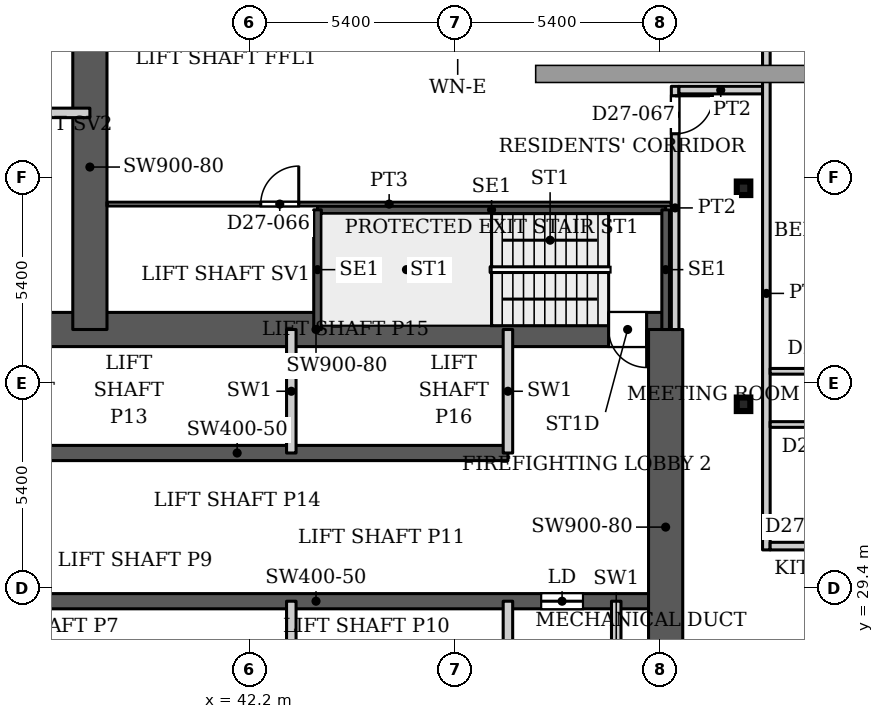
"""IFC4 building model, lengths in metres.
Left out: names, types, materials, properties, quantities, classifications, styles, units other than length and angle.
Written with IfcOpenShell. Run it as: python <this file> out.ifc"""

import sys

from ifc_helpers import new_model, si_unit, direction, frame, frame_2d, origin, origin_2d, place, context, subcontext, project, spatial, rectangle, hollow_rectangle, extrude, source, transform, mapped, element, fill, save


model = new_model("IFC4")
c1 = context("Model", 3, precision=1e-05, world=origin(), true_north=direction((0.0, 1.0)))
c2 = subcontext(c1, "Body", "Model", "MODEL_VIEW")
j1 = project(units=[si_unit("LENGTHUNIT", "METRE"), si_unit("PLANEANGLEUNIT", "RADIAN")], contexts=[c1])
p1 = place(None, origin())
s1 = spatial("IfcSite", under=j1, at=p1, CompositionType="ELEMENT")
p2 = place(p1, origin())
s2 = spatial("IfcBuilding", under=s1, at=p2, CompositionType="ELEMENT")
p3 = place(p2, frame((0.0, 0.0, 117.5)))
s3 = spatial("IfcBuildingStorey", under=s2, at=p3, CompositionType="ELEMENT", Elevation=117.5)
for number, where, z_axis, x_axis in (
    (1, (55.2, 34.232, 0.0), (0.0, 0.0, 1.0), (1.0, 0.0, 0.0)),
    (2, (55.2, 39.916, 0.0), (0.0, 0.0, 1.0), (1.0, 0.0, 0.0)),
):
    element("IfcColumn", number, at=place(p3, frame(where, z_axis=z_axis, x_axis=x_axis)), inside=s3, PredefinedType="COLUMN", context=c2, shape_type="SweptSolid", body=[
        extrude(hollow_rectangle(XDim=0.356, YDim=0.356, WallThickness=0.016, InnerFilletRadius=0.016, OuterFilletRadius=0.032, at=origin_2d()), origin(), (0.0, 0.0, 1.0), 3.9),
    ])
p4 = place(p3, frame((34.75, 29.05, 0.0), z_axis=(0.0, 0.0, 1.0), x_axis=(1.0, 0.0, 0.0)))
e3 = element("IfcWall", 3, at=p4, inside=s3, PredefinedType="SHEAR", context=c2, shape_type="SweptSolid", body=[
    extrude(rectangle(XDim=18.4, YDim=0.4, at=frame_2d((9.2, 0.0))), origin(), (0.0, 0.0, 1.0), 3.9),
])
p5 = place(p4, frame((15.125, 0.0, 0.0)))
e4 = element("IfcOpeningElement", 4, at=p5, cuts=e3, PredefinedType="OPENING", context=c2, shape_type="SweptSolid", body=[
    extrude(rectangle(XDim=1.1, YDim=2.2, at=frame_2d((0.55, 1.1))), frame((0.0, 0.21, 0.0), z_axis=(0.0, -1.0, 0.0), x_axis=(1.0, 0.0, 0.0)), (0.0, 0.0, 1.0), 0.42),
])
p6 = place(p3, frame((34.75, 32.95, 0.0), z_axis=(0.0, 0.0, 1.0), x_axis=(1.0, 0.0, 0.0)))
e5 = element("IfcWall", 5, at=p6, inside=s3, PredefinedType="SHEAR", context=c2, shape_type="SweptSolid", body=[
    extrude(rectangle(XDim=14.25, YDim=0.4, at=frame_2d((7.125, 0.0))), origin(), (0.0, 0.0, 1.0), 3.9),
])
p7 = place(p3, frame((34.75, 36.2, 0.0), z_axis=(0.0, 0.0, 1.0), x_axis=(1.0, 0.0, 0.0)))
e6 = element("IfcWall", 6, at=p7, inside=s3, PredefinedType="SHEAR", context=c2, shape_type="SweptSolid", body=[
    extrude(rectangle(XDim=18.4, YDim=0.9, at=frame_2d((9.2, 0.0))), origin(), (0.0, 0.0, 1.0), 3.9),
])
p8 = place(p7, frame((16.9, 0.0, 0.0)))
e7 = element("IfcOpeningElement", 7, at=p8, cuts=e6, PredefinedType="OPENING", context=c2, shape_type="SweptSolid", body=[
    extrude(rectangle(XDim=1.0, YDim=2.2, at=frame_2d((0.5, 1.1))), frame((0.0, 0.46, 0.0), z_axis=(0.0, -1.0, 0.0), x_axis=(1.0, 0.0, 0.0)), (0.0, 0.0, 1.0), 0.92),
])
p9 = place(p3, frame((38.0, 36.2, 0.0), z_axis=(0.0, 0.0, 1.0), x_axis=(0.0, 1.0, 0.0)))
e8 = element("IfcWall", 8, at=p9, inside=s3, PredefinedType="SHEAR", context=c2, shape_type="SweptSolid", body=[
    extrude(rectangle(XDim=8.55, YDim=0.9, at=frame_2d((4.275, 0.0))), origin(), (0.0, 0.0, 1.0), 3.9),
])
p10 = place(p3, frame((53.15, 25.8, 0.0), z_axis=(0.0, 0.0, 1.0), x_axis=(0.0, 1.0, 0.0)))
e9 = element("IfcWall", 9, at=p10, inside=s3, PredefinedType="SHEAR", context=c2, shape_type="SweptSolid", body=[
    extrude(rectangle(XDim=10.4, YDim=0.9, at=frame_2d((5.2, 0.0))), origin(), (0.0, 0.0, 1.0), 3.9),
])
p11 = place(p3, frame((43.99, 39.35, 0.0), z_axis=(0.0, 0.0, 1.0), x_axis=(1.0, 0.0, 0.0)))
e10 = element("IfcWall", 10, at=p11, inside=s3, PredefinedType="SHEAR", context=c2, shape_type="SweptSolid", body=[
    extrude(rectangle(XDim=9.16, YDim=0.2, at=frame_2d((4.58, 0.0))), origin(), (0.0, 0.0, 1.0), 3.9),
])
for number, where, z_axis, x_axis in (
    (11, (43.99, 36.2, 0.0), (0.0, 0.0, 1.0), (0.0, 1.0, 0.0)),
    (12, (53.15, 36.2, 0.0), (0.0, 0.0, 1.0), (0.0, 1.0, 0.0)),
):
    element("IfcWall", number, at=place(p3, frame(where, z_axis=z_axis, x_axis=x_axis)), inside=s3, PredefinedType="SHEAR", context=c2, shape_type="SweptSolid", body=[
        extrude(rectangle(XDim=3.15, YDim=0.2, at=frame_2d((1.575, 0.0))), origin(), (0.0, 0.0, 1.0), 3.9),
    ])
for number, where, z_axis, x_axis in (
    (13, (43.3, 25.8, 0.0), (0.0, 0.0, 1.0), (0.0, 1.0, 0.0)),
    (14, (43.3, 32.95, 0.0), (0.0, 0.0, 1.0), (0.0, 1.0, 0.0)),
    (15, (49.0, 25.8, 0.0), (0.0, 0.0, 1.0), (0.0, 1.0, 0.0)),
    (16, (49.0, 32.95, 0.0), (0.0, 0.0, 1.0), (0.0, 1.0, 0.0)),
    (17, (51.85, 25.8, 0.0), (0.0, 0.0, 1.0), (0.0, 1.0, 0.0)),
    (18, (34.75, 41.9, 0.0), (0.0, 0.0, 1.0), (1.0, 0.0, 0.0)),
):
    element("IfcWall", number, at=place(p3, frame(where, z_axis=z_axis, x_axis=x_axis)), inside=s3, PredefinedType="PARTITIONING", context=c2, shape_type="SweptSolid", body=[
        extrude(rectangle(XDim=3.25, YDim=0.25, at=frame_2d((1.625, 0.0))), origin(), (0.0, 0.0, 1.0), 3.9),
    ])
p12 = place(p3, frame((38.449, 39.5, 0.0), z_axis=(0.0, 0.0, 1.0), x_axis=(1.0, 0.0, 0.0)))
e19 = element("IfcWall", 19, at=p12, inside=s3, PredefinedType="PARTITIONING", context=c2, shape_type="SweptSolid", body=[
    extrude(rectangle(XDim=14.851, YDim=0.1, at=frame_2d((7.426, 0.0))), origin(), (0.0, 0.0, 1.0), 3.6),
])
p13 = place(p12, frame((4.047, 0.0, 0.0)))
e20 = element("IfcOpeningElement", 20, at=p13, cuts=e19, PredefinedType="OPENING", context=c2, shape_type="SweptSolid", body=[
    extrude(rectangle(XDim=1.0, YDim=2.1, at=frame_2d((0.5, 1.05))), frame((0.0, 0.06, 0.0), z_axis=(0.0, -1.0, 0.0), x_axis=(1.0, 0.0, 0.0)), (0.0, 0.0, 1.0), 0.12),
])
p14 = place(p3, frame((53.4, 36.199, 0.0), z_axis=(0.0, 0.0, 1.0), x_axis=(0.0, 1.0, 0.0)))
e21 = element("IfcWall", 21, at=p14, inside=s3, PredefinedType="PARTITIONING", context=c2, shape_type="SweptSolid", body=[
    extrude(rectangle(XDim=6.401, YDim=0.2, at=frame_2d((3.201, 0.0))), origin(), (0.0, 0.0, 1.0), 3.6),
])
p15 = place(p14, frame((5.151, 0.0, 0.0)))
e22 = element("IfcOpeningElement", 22, at=p15, cuts=e21, PredefinedType="OPENING", context=c2, shape_type="SweptSolid", body=[
    extrude(rectangle(XDim=1.0, YDim=2.1, at=frame_2d((0.5, 1.05))), frame((0.0, 0.11, 0.0), z_axis=(0.0, -1.0, 0.0), x_axis=(1.0, 0.0, 0.0)), (0.0, 0.0, 1.0), 0.22),
])
p16 = place(p3, frame((53.5, 42.5, 0.0), z_axis=(0.0, 0.0, 1.0), x_axis=(1.0, 0.0, 0.0)))
e23 = element("IfcWall", 23, at=p16, inside=s3, PredefinedType="PARTITIONING", context=c2, shape_type="SweptSolid", body=[
    extrude(rectangle(XDim=2.2, YDim=0.2, at=frame_2d((1.1, 0.0))), origin(), (0.0, 0.0, 1.0), 3.6),
])
p17 = place(p3, frame((55.8, 30.4, 0.0), z_axis=(0.0, 0.0, 1.0), x_axis=(0.0, 1.0, 0.0)))
e24 = element("IfcWall", 24, at=p17, inside=s3, PredefinedType="PARTITIONING", context=c2, shape_type="SweptSolid", body=[
    extrude(rectangle(XDim=13.5, YDim=0.2, at=frame_2d((6.75, 0.0))), origin(), (0.0, 0.0, 1.0), 3.6),
])
p18 = place(p3, frame((55.9, 30.5, 0.0), z_axis=(0.0, 0.0, 1.0), x_axis=(1.0, 0.0, 0.0)))
e25 = element("IfcWall", 25, at=p18, inside=s3, PredefinedType="PARTITIONING", context=c2, shape_type="SweptSolid", body=[
    extrude(rectangle(XDim=42.2, YDim=0.2, at=frame_2d((21.1, 0.0))), origin(), (0.0, 0.0, 1.0), 3.6),
])
p19 = place(p18, frame((4.8, 0.0, 0.0)))
e26 = element("IfcOpeningElement", 26, at=p19, cuts=e25, PredefinedType="OPENING", context=c2, shape_type="SweptSolid", body=[
    extrude(rectangle(XDim=1.0, YDim=2.1, at=frame_2d((0.5, 1.05))), frame((0.0, 0.11, 0.0), z_axis=(0.0, -1.0, 0.0), x_axis=(1.0, 0.0, 0.0)), (0.0, 0.0, 1.0), 0.22),
])
p20 = place(p18, frame((11.1, 0.0, 0.0)))
e27 = element("IfcOpeningElement", 27, at=p20, cuts=e25, PredefinedType="OPENING", context=c2, shape_type="SweptSolid", body=[
    extrude(rectangle(XDim=1.0, YDim=2.1, at=frame_2d((0.5, 1.05))), frame((0.0, 0.11, 0.0), z_axis=(0.0, -1.0, 0.0), x_axis=(1.0, 0.0, 0.0)), (0.0, 0.0, 1.0), 0.22),
])
p21 = place(p18, frame((39.0, 0.0, 0.0)))
e28 = element("IfcOpeningElement", 28, at=p21, cuts=e25, PredefinedType="OPENING", context=c2, shape_type="SweptSolid", body=[
    extrude(rectangle(XDim=1.0, YDim=2.1, at=frame_2d((0.5, 1.05))), frame((0.0, 0.11, 0.0), z_axis=(0.0, -1.0, 0.0), x_axis=(1.0, 0.0, 0.0)), (0.0, 0.0, 1.0), 0.22),
])
p22 = place(p3, frame((55.9, 33.7, 0.0), z_axis=(0.0, 0.0, 1.0), x_axis=(1.0, 0.0, 0.0)))
e29 = element("IfcWall", 29, at=p22, inside=s3, PredefinedType="PARTITIONING", context=c2, shape_type="SweptSolid", body=[
    extrude(rectangle(XDim=4.475, YDim=0.15, at=frame_2d((2.238, 0.0))), origin(), (0.0, 0.0, 1.0), 3.6),
])
p23 = place(p22, frame((0.95, 0.0, 0.0)))
e30 = element("IfcOpeningElement", 30, at=p23, cuts=e29, PredefinedType="OPENING", context=c2, shape_type="SweptSolid", body=[
    extrude(rectangle(XDim=0.9, YDim=2.1, at=frame_2d((0.45, 1.05))), frame((0.0, 0.085, 0.0), z_axis=(0.0, -1.0, 0.0), x_axis=(1.0, 0.0, 0.0)), (0.0, 0.0, 1.0), 0.17),
])
p24 = place(p22, frame((3.25, 0.0, 0.0)))
e31 = element("IfcOpeningElement", 31, at=p24, cuts=e29, PredefinedType="OPENING", context=c2, shape_type="SweptSolid", body=[
    extrude(rectangle(XDim=0.8, YDim=2.1, at=frame_2d((0.4, 1.05))), frame((0.0, 0.085, 0.0), z_axis=(0.0, -1.0, 0.0), x_axis=(1.0, 0.0, 0.0)), (0.0, 0.0, 1.0), 0.17),
])
p25 = place(p3, frame((55.9, 35.1, 0.0), z_axis=(0.0, 0.0, 1.0), x_axis=(1.0, 0.0, 0.0)))
e32 = element("IfcWall", 32, at=p25, inside=s3, PredefinedType="PARTITIONING", context=c2, shape_type="SweptSolid", body=[
    extrude(rectangle(XDim=10.6, YDim=0.15, at=frame_2d((5.3, 0.0))), origin(), (0.0, 0.0, 1.0), 3.6),
])
p26 = place(p25, frame((1.1, 0.0, 0.0)))
e33 = element("IfcOpeningElement", 33, at=p26, cuts=e32, PredefinedType="OPENING", context=c2, shape_type="SweptSolid", body=[
    extrude(rectangle(XDim=0.9, YDim=2.1, at=frame_2d((0.45, 1.05))), frame((0.0, 0.085, 0.0), z_axis=(0.0, -1.0, 0.0), x_axis=(1.0, 0.0, 0.0)), (0.0, 0.0, 1.0), 0.17),
])
p27 = place(p25, frame((8.25, 0.0, 0.0)))
e34 = element("IfcOpeningElement", 34, at=p27, cuts=e32, PredefinedType="OPENING", context=c2, shape_type="SweptSolid", body=[
    extrude(rectangle(XDim=1.0, YDim=2.1, at=frame_2d((0.5, 1.05))), frame((0.0, 0.085, 0.0), z_axis=(0.0, -1.0, 0.0), x_axis=(1.0, 0.0, 0.0)), (0.0, 0.0, 1.0), 0.17),
])
p28 = place(p25, frame((5.6, 0.0, 0.0)))
e35 = element("IfcOpeningElement", 35, at=p28, cuts=e32, PredefinedType="OPENING", context=c2, shape_type="SweptSolid", body=[
    extrude(rectangle(XDim=0.9, YDim=2.1, at=frame_2d((0.45, 1.05))), frame((0.0, 0.085, 0.0), z_axis=(0.0, -1.0, 0.0), x_axis=(1.0, 0.0, 0.0)), (0.0, 0.0, 1.0), 0.17),
])
m1 = source(origin(), c2, "Body", "SweptSolid", [
    extrude(rectangle(XDim=1.1, YDim=2.2, at=frame_2d((0.55, 1.1))), frame((0.0, 0.025, 0.0), z_axis=(0.0, -1.0, 0.0), x_axis=(1.0, 0.0, 0.0)), (0.0, 0.0, 1.0), 0.05),
])
p29 = place(p5, origin())
e36 = element("IfcDoor", 36, at=p29, inside=s3, OperationType="SLIDING_TO_LEFT", PredefinedType="DOOR", context=c2, shape_type="MappedRepresentation", body=[
    mapped(m1, transform((0.0, 0.0, 0.0), x_axis=(1.0, 0.0, 0.0), y_axis=(0.0, 1.0, 0.0), z_axis=(0.0, 0.0, 1.0), scale=1.0)),
])
fill(e4, e36)
m2 = source(origin(), c2, "Body", "SweptSolid", [
    extrude(rectangle(XDim=1.0, YDim=2.2, at=frame_2d((0.5, 1.1))), frame((0.0, 0.025, 0.0), z_axis=(0.0, -1.0, 0.0), x_axis=(1.0, 0.0, 0.0)), (0.0, 0.0, 1.0), 0.05),
])
p30 = place(p8, origin())
e37 = element("IfcDoor", 37, at=p30, inside=s3, OperationType="SINGLE_SWING_RIGHT", PredefinedType="DOOR", context=c2, shape_type="MappedRepresentation", body=[
    mapped(m2, transform((0.0, 0.0, 0.0), x_axis=(1.0, 0.0, 0.0), y_axis=(0.0, 1.0, 0.0), z_axis=(0.0, 0.0, 1.0), scale=1.0)),
])
fill(e7, e37)
m3 = source(origin(), c2, "Body", "SweptSolid", [
    extrude(rectangle(XDim=1.0, YDim=2.1, at=frame_2d((0.5, 1.05))), frame((0.0, 0.025, 0.0), z_axis=(0.0, -1.0, 0.0), x_axis=(1.0, 0.0, 0.0)), (0.0, 0.0, 1.0), 0.05),
])
p31 = place(p13, origin())
e38 = element("IfcDoor", 38, at=p31, inside=s3, OperationType="SINGLE_SWING_LEFT", PredefinedType="DOOR", context=c2, shape_type="MappedRepresentation", body=[
    mapped(m3, transform((0.0, 0.0, 0.0), x_axis=(1.0, 0.0, 0.0), y_axis=(0.0, 1.0, 0.0), z_axis=(0.0, 0.0, 1.0), scale=1.0)),
])
fill(e20, e38)
m4 = source(origin(), c2, "Body", "SweptSolid", [
    extrude(rectangle(XDim=1.0, YDim=2.1, at=frame_2d((0.5, 1.05))), frame((0.0, 0.025, 0.0), z_axis=(0.0, -1.0, 0.0), x_axis=(1.0, 0.0, 0.0)), (0.0, 0.0, 1.0), 0.05),
])
p32 = place(p15, origin())
e39 = element("IfcDoor", 39, at=p32, inside=s3, OperationType="SINGLE_SWING_RIGHT", PredefinedType="DOOR", context=c2, shape_type="MappedRepresentation", body=[
    mapped(m4, transform((0.0, 0.0, 0.0), x_axis=(1.0, 0.0, 0.0), y_axis=(0.0, 1.0, 0.0), z_axis=(0.0, 0.0, 1.0), scale=1.0)),
])
fill(e22, e39)
save(model, sys.argv[1])
